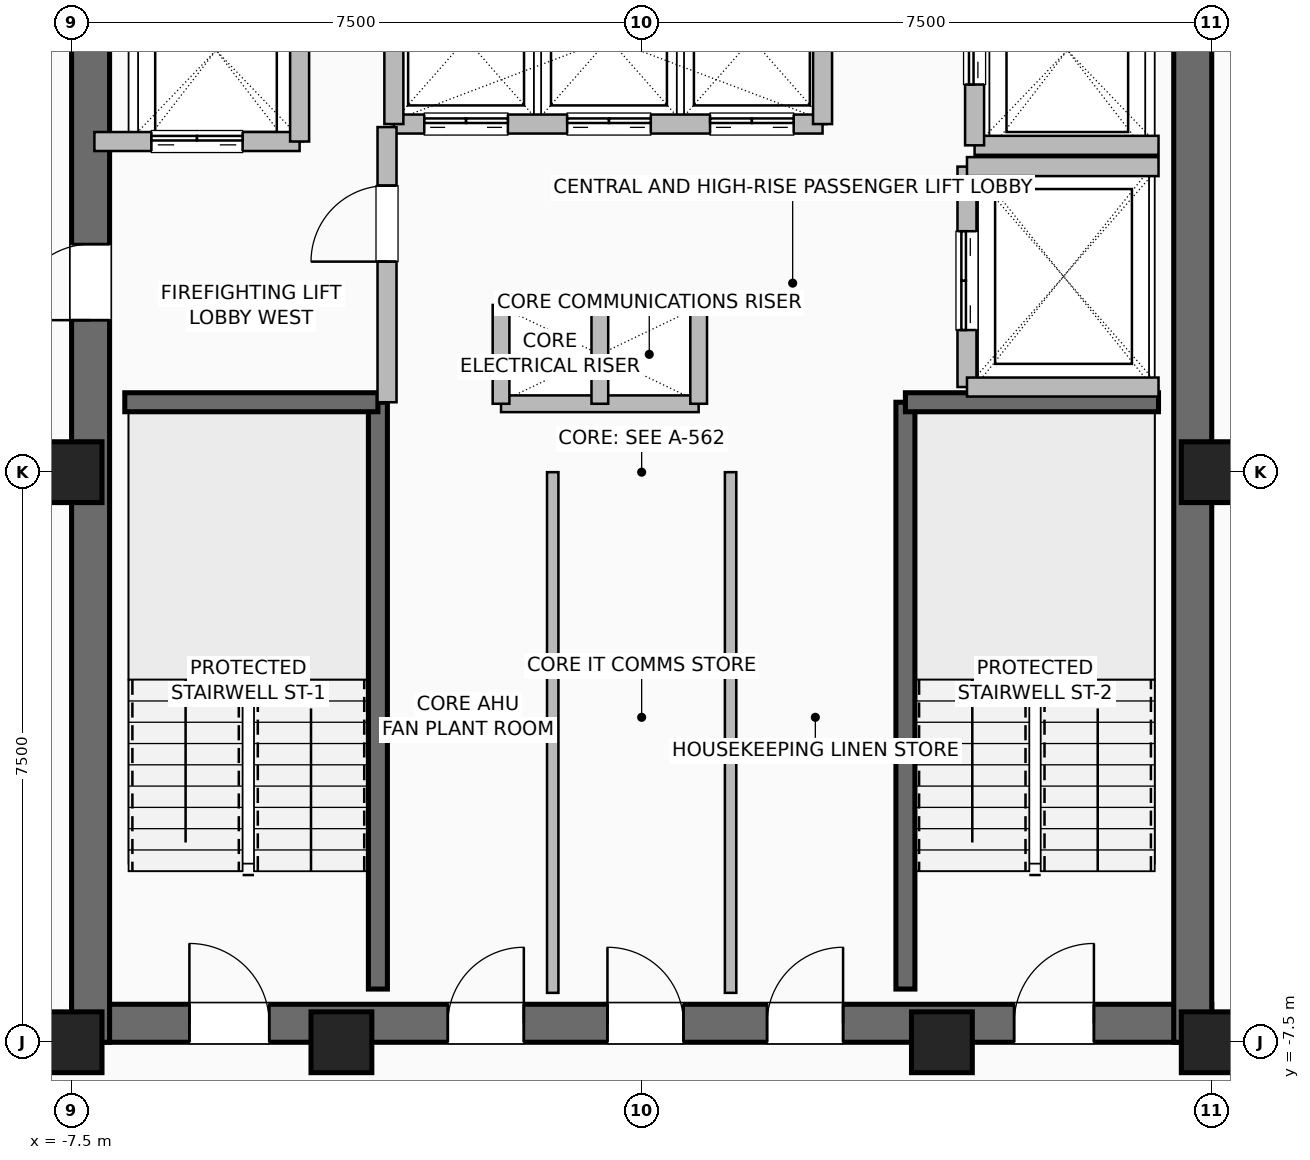
"""IFC4 building model, lengths in metres.
Left out: names, types, materials, properties, quantities, classifications, styles, units other than length and angle.
Written with IfcOpenShell. Run it as: python <this file> out.ifc"""

import sys

from ifc_helpers import new_model, si_unit, direction, frame, frame_2d, origin, origin_2d, place, context, subcontext, project, spatial, rectangle, hollow_rectangle, extrude, element, fill, save


model = new_model("IFC4")
c1 = context("Model", 3, precision=1e-05, world=origin(), true_north=direction((0.0, 1.0)))
c2 = subcontext(c1, "Body", "Model", "MODEL_VIEW")
j1 = project(units=[si_unit("LENGTHUNIT", "METRE"), si_unit("PLANEANGLEUNIT", "RADIAN")], contexts=[c1])
p1 = place(None, origin())
s1 = spatial("IfcSite", under=j1, at=p1, CompositionType="ELEMENT")
p2 = place(p1, origin())
s2 = spatial("IfcBuilding", under=s1, at=p2, CompositionType="ELEMENT")
p3 = place(p2, frame((0.0, 0.0, 250.4)))
s3 = spatial("IfcBuildingStorey", under=s2, at=p3, CompositionType="ELEMENT", Elevation=250.4)
for number, where, z_axis, x_axis in (
    (1, (-7.5, -7.5, 0.0), (0.0, 0.0, 1.0), (1.0, 0.0, 0.0)),
    (2, (-3.95, -7.5, 0.0), (0.0, 0.0, 1.0), (1.0, 0.0, 0.0)),
    (3, (3.95, -7.5, 0.0), (0.0, 0.0, 1.0), (1.0, 0.0, 0.0)),
    (4, (7.5, -7.5, 0.0), (0.0, 0.0, 1.0), (1.0, 0.0, 0.0)),
    (5, (7.5, 0.0, 0.0), (0.0, 0.0, 1.0), (1.0, 0.0, 0.0)),
    (6, (-7.5, 0.0, 0.0), (0.0, 0.0, 1.0), (1.0, 0.0, 0.0)),
):
    element("IfcColumn", number, at=place(p3, frame(where, z_axis=z_axis, x_axis=x_axis)), inside=s3, PredefinedType="COLUMN", context=c2, shape_type="SweptSolid", body=[
        extrude(hollow_rectangle(XDim=0.8, YDim=0.8, WallThickness=0.04, at=origin_2d()), origin(), (0.0, 0.0, 1.0), 3.6),
    ])
p4 = place(p3, frame((-7.5, -7.25, 0.0), z_axis=(0.0, 0.0, 1.0), x_axis=(1.0, 0.0, 0.0)))
e7 = element("IfcWall", 7, at=p4, inside=s3, PredefinedType="SHEAR", context=c2, shape_type="SweptSolid", body=[
    extrude(rectangle(XDim=15.0, YDim=0.5, at=frame_2d((7.5, 0.0))), origin(), (0.0, 0.0, 1.0), 3.36),
])
p5 = place(p4, frame((1.55, 0.0, 0.0)))
e8 = element("IfcOpeningElement", 8, at=p5, cuts=e7, PredefinedType="OPENING", context=c2, shape_type="SweptSolid", body=[
    extrude(rectangle(XDim=1.05, YDim=2.08, at=frame_2d((0.525, 1.04))), frame((0.0, 0.26, 0.0), z_axis=(0.0, -1.0, 0.0), x_axis=(1.0, 0.0, 0.0)), (0.0, 0.0, 1.0), 0.52),
])
p6 = place(p4, frame((12.4, 0.0, 0.0)))
e9 = element("IfcOpeningElement", 9, at=p6, cuts=e7, PredefinedType="OPENING", context=c2, shape_type="SweptSolid", body=[
    extrude(rectangle(XDim=1.05, YDim=2.08, at=frame_2d((0.525, 1.04))), frame((0.0, 0.26, 0.0), z_axis=(0.0, -1.0, 0.0), x_axis=(1.0, 0.0, 0.0)), (0.0, 0.0, 1.0), 0.52),
])
p7 = place(p4, frame((4.95, 0.0, 0.0)))
e10 = element("IfcOpeningElement", 10, at=p7, cuts=e7, PredefinedType="OPENING", context=c2, shape_type="SweptSolid", body=[
    extrude(rectangle(XDim=1.0, YDim=2.08, at=frame_2d((0.5, 1.04))), frame((0.0, 0.26, 0.0), z_axis=(0.0, -1.0, 0.0), x_axis=(1.0, 0.0, 0.0)), (0.0, 0.0, 1.0), 0.52),
])
p8 = place(p4, frame((7.05, 0.0, 0.0)))
e11 = element("IfcOpeningElement", 11, at=p8, cuts=e7, PredefinedType="OPENING", context=c2, shape_type="SweptSolid", body=[
    extrude(rectangle(XDim=1.0, YDim=2.08, at=frame_2d((0.5, 1.04))), frame((0.0, 0.26, 0.0), z_axis=(0.0, -1.0, 0.0), x_axis=(1.0, 0.0, 0.0)), (0.0, 0.0, 1.0), 0.52),
])
p9 = place(p4, frame((9.15, 0.0, 0.0)))
e12 = element("IfcOpeningElement", 12, at=p9, cuts=e7, PredefinedType="OPENING", context=c2, shape_type="SweptSolid", body=[
    extrude(rectangle(XDim=1.0, YDim=2.08, at=frame_2d((0.5, 1.04))), frame((0.0, 0.26, 0.0), z_axis=(0.0, -1.0, 0.0), x_axis=(1.0, 0.0, 0.0)), (0.0, 0.0, 1.0), 0.52),
])
p10 = place(p3, frame((-7.25, -7.5, 0.0), z_axis=(0.0, 0.0, 1.0), x_axis=(0.0, 1.0, 0.0)))
e13 = element("IfcWall", 13, at=p10, inside=s3, PredefinedType="SHEAR", context=c2, shape_type="SweptSolid", body=[
    extrude(rectangle(XDim=15.0, YDim=0.5, at=frame_2d((7.5, 0.0))), origin(), (0.0, 0.0, 1.0), 3.36),
])
p11 = place(p10, frame((9.5, 0.0, 0.0)))
e14 = element("IfcOpeningElement", 14, at=p11, cuts=e13, PredefinedType="OPENING", context=c2, shape_type="SweptSolid", body=[
    extrude(rectangle(XDim=1.0, YDim=2.08, at=frame_2d((0.5, 1.04))), frame((0.0, 0.26, 0.0), z_axis=(0.0, -1.0, 0.0), x_axis=(1.0, 0.0, 0.0)), (0.0, 0.0, 1.0), 0.52),
])
p12 = place(p3, frame((7.25, -7.5, 0.0), z_axis=(0.0, 0.0, 1.0), x_axis=(0.0, 1.0, 0.0)))
e15 = element("IfcWall", 15, at=p12, inside=s3, PredefinedType="SHEAR", context=c2, shape_type="SweptSolid", body=[
    extrude(rectangle(XDim=15.0, YDim=0.5, at=frame_2d((7.5, 0.0))), origin(), (0.0, 0.0, 1.0), 3.36),
])
p13 = place(p3, frame((-3.47, -6.8, 0.0), z_axis=(0.0, 0.0, 1.0), x_axis=(0.0, 1.0, 0.0)))
e16 = element("IfcWall", 16, at=p13, inside=s3, PredefinedType="SHEAR", context=c2, shape_type="SweptSolid", body=[
    extrude(rectangle(XDim=7.72, YDim=0.25, at=frame_2d((3.86, 0.0))), origin(), (0.0, 0.0, 1.0), 3.36),
])
p14 = place(p3, frame((-6.8, 0.92, 0.0), z_axis=(0.0, 0.0, 1.0), x_axis=(1.0, 0.0, 0.0)))
e17 = element("IfcWall", 17, at=p14, inside=s3, PredefinedType="SHEAR", context=c2, shape_type="SweptSolid", body=[
    extrude(rectangle(XDim=3.33, YDim=0.25, at=frame_2d((1.665, 0.0))), origin(), (0.0, 0.0, 1.0), 3.36),
])
p15 = place(p3, frame((3.47, -6.8, 0.0), z_axis=(0.0, 0.0, 1.0), x_axis=(0.0, 1.0, 0.0)))
e18 = element("IfcWall", 18, at=p15, inside=s3, PredefinedType="SHEAR", context=c2, shape_type="SweptSolid", body=[
    extrude(rectangle(XDim=7.72, YDim=0.25, at=frame_2d((3.86, 0.0))), origin(), (0.0, 0.0, 1.0), 3.36),
])
p16 = place(p3, frame((3.47, 0.92, 0.0), z_axis=(0.0, 0.0, 1.0), x_axis=(1.0, 0.0, 0.0)))
e19 = element("IfcWall", 19, at=p16, inside=s3, PredefinedType="SHEAR", context=c2, shape_type="SweptSolid", body=[
    extrude(rectangle(XDim=3.33, YDim=0.25, at=frame_2d((1.665, 0.0))), origin(), (0.0, 0.0, 1.0), 3.36),
])
for number, where, z_axis, x_axis in (
    (20, (-1.85, 2.2, 0.0), (0.0, 0.0, 1.0), (1.0, 0.0, 0.0)),
    (21, (-1.85, 0.9, 0.0), (0.0, 0.0, 1.0), (1.0, 0.0, 0.0)),
):
    element("IfcWall", number, at=place(p3, frame(where, z_axis=z_axis, x_axis=x_axis)), inside=s3, PredefinedType="PARTITIONING", context=c2, shape_type="SweptSolid", body=[
        extrude(rectangle(XDim=2.6, YDim=0.22, at=frame_2d((1.3, 0.0))), origin(), (0.0, 0.0, 1.0), 3.36),
    ])
for number, where, z_axis, x_axis in (
    (22, (-0.55, 0.9, 0.0), (0.0, 0.0, 1.0), (0.0, 1.0, 0.0)),
    (23, (0.75, 0.9, 0.0), (0.0, 0.0, 1.0), (0.0, 1.0, 0.0)),
    (24, (-1.85, 0.9, 0.0), (0.0, 0.0, 1.0), (0.0, 1.0, 0.0)),
):
    element("IfcWall", number, at=place(p3, frame(where, z_axis=z_axis, x_axis=x_axis)), inside=s3, PredefinedType="PARTITIONING", context=c2, shape_type="SweptSolid", body=[
        extrude(rectangle(XDim=1.3, YDim=0.22, at=frame_2d((0.65, 0.0))), origin(), (0.0, 0.0, 1.0), 3.36),
    ])
p17 = place(p3, frame((-3.26, 4.58, 0.0), z_axis=(0.0, 0.0, 1.0), x_axis=(1.0, 0.0, 0.0)))
e25 = element("IfcWall", 25, at=p17, inside=s3, PredefinedType="SHEAR", context=c2, shape_type="SweptSolid", body=[
    extrude(rectangle(XDim=5.64, YDim=0.25, at=frame_2d((2.82, 0.0))), origin(), (0.0, 0.0, 1.0), 3.36),
])
p18 = place(p17, frame((0.4, 0.0, 0.0)))
e26 = element("IfcOpeningElement", 26, at=p18, cuts=e25, PredefinedType="OPENING", context=c2, shape_type="SweptSolid", body=[
    extrude(rectangle(XDim=1.1, YDim=2.2, at=frame_2d((0.55, 1.1))), frame((0.0, 0.135, 0.0), z_axis=(0.0, -1.0, 0.0), x_axis=(1.0, 0.0, 0.0)), (0.0, 0.0, 1.0), 0.27),
])
p19 = place(p17, frame((2.28, 0.0, 0.0)))
e27 = element("IfcOpeningElement", 27, at=p19, cuts=e25, PredefinedType="OPENING", context=c2, shape_type="SweptSolid", body=[
    extrude(rectangle(XDim=1.1, YDim=2.2, at=frame_2d((0.55, 1.1))), frame((0.0, 0.135, 0.0), z_axis=(0.0, -1.0, 0.0), x_axis=(1.0, 0.0, 0.0)), (0.0, 0.0, 1.0), 0.27),
])
p20 = place(p17, frame((4.16, 0.0, 0.0)))
e28 = element("IfcOpeningElement", 28, at=p20, cuts=e25, PredefinedType="OPENING", context=c2, shape_type="SweptSolid", body=[
    extrude(rectangle(XDim=1.1, YDim=2.2, at=frame_2d((0.55, 1.1))), frame((0.0, 0.135, 0.0), z_axis=(0.0, -1.0, 0.0), x_axis=(1.0, 0.0, 0.0)), (0.0, 0.0, 1.0), 0.27),
])
for number, where, z_axis, x_axis in (
    (29, (-3.26, 4.58, 0.0), (0.0, 0.0, 1.0), (0.0, 1.0, 0.0)),
    (30, (2.38, 4.58, 0.0), (0.0, 0.0, 1.0), (0.0, 1.0, 0.0)),
):
    element("IfcWall", number, at=place(p3, frame(where, z_axis=z_axis, x_axis=x_axis)), inside=s3, PredefinedType="SHEAR", context=c2, shape_type="SweptSolid", body=[
        extrude(rectangle(XDim=2.22, YDim=0.25, at=frame_2d((1.11, 0.0))), origin(), (0.0, 0.0, 1.0), 3.36),
    ])
p21 = place(p3, frame((-7.2, 4.35, 0.0), z_axis=(0.0, 0.0, 1.0), x_axis=(1.0, 0.0, 0.0)))
e31 = element("IfcWall", 31, at=p21, inside=s3, PredefinedType="SHEAR", context=c2, shape_type="SweptSolid", body=[
    extrude(rectangle(XDim=2.7, YDim=0.25, at=frame_2d((1.35, 0.0))), origin(), (0.0, 0.0, 1.0), 3.36),
])
p22 = place(p21, frame((0.75, 0.0, 0.0)))
e32 = element("IfcOpeningElement", 32, at=p22, cuts=e31, PredefinedType="OPENING", context=c2, shape_type="SweptSolid", body=[
    extrude(rectangle(XDim=1.2, YDim=2.2, at=frame_2d((0.6, 1.1))), frame((0.0, 0.135, 0.0), z_axis=(0.0, -1.0, 0.0), x_axis=(1.0, 0.0, 0.0)), (0.0, 0.0, 1.0), 0.27),
])
p23 = place(p3, frame((-4.5, 4.35, 0.0), z_axis=(0.0, 0.0, 1.0), x_axis=(0.0, 1.0, 0.0)))
e33 = element("IfcWall", 33, at=p23, inside=s3, PredefinedType="SHEAR", context=c2, shape_type="SweptSolid", body=[
    extrude(rectangle(XDim=2.85, YDim=0.25, at=frame_2d((1.425, 0.0))), origin(), (0.0, 0.0, 1.0), 3.36),
])
p24 = place(p3, frame((4.38, 4.3, 0.0), z_axis=(0.0, 0.0, 1.0), x_axis=(1.0, 0.0, 0.0)))
e34 = element("IfcWall", 34, at=p24, inside=s3, PredefinedType="SHEAR", context=c2, shape_type="SweptSolid", body=[
    extrude(rectangle(XDim=2.42, YDim=0.25, at=frame_2d((1.21, 0.0))), origin(), (0.0, 0.0, 1.0), 3.36),
])
p25 = place(p3, frame((4.38, 4.3, 0.0), z_axis=(0.0, 0.0, 1.0), x_axis=(0.0, 1.0, 0.0)))
e35 = element("IfcWall", 35, at=p25, inside=s3, PredefinedType="SHEAR", context=c2, shape_type="SweptSolid", body=[
    extrude(rectangle(XDim=2.5, YDim=0.25, at=frame_2d((1.25, 0.0))), origin(), (0.0, 0.0, 1.0), 3.36),
])
p26 = place(p25, frame((0.8, 0.0, 0.0)))
e36 = element("IfcOpeningElement", 36, at=p26, cuts=e35, PredefinedType="OPENING", context=c2, shape_type="SweptSolid", body=[
    extrude(rectangle(XDim=1.2, YDim=2.2, at=frame_2d((0.6, 1.1))), frame((0.0, 0.135, 0.0), z_axis=(0.0, -1.0, 0.0), x_axis=(1.0, 0.0, 0.0)), (0.0, 0.0, 1.0), 0.27),
])
p27 = place(p3, frame((4.28, 1.12, 0.0), z_axis=(0.0, 0.0, 1.0), x_axis=(0.0, 1.0, 0.0)))
e37 = element("IfcWall", 37, at=p27, inside=s3, PredefinedType="SHEAR", context=c2, shape_type="SweptSolid", body=[
    extrude(rectangle(XDim=2.9, YDim=0.25, at=frame_2d((1.45, 0.0))), origin(), (0.0, 0.0, 1.0), 3.36),
])
p28 = place(p27, frame((0.75, 0.0, 0.0)))
e38 = element("IfcOpeningElement", 38, at=p28, cuts=e37, PredefinedType="OPENING", context=c2, shape_type="SweptSolid", body=[
    extrude(rectangle(XDim=1.3, YDim=2.3, at=frame_2d((0.65, 1.15))), frame((0.0, 0.135, 0.0), z_axis=(0.0, -1.0, 0.0), x_axis=(1.0, 0.0, 0.0)), (0.0, 0.0, 1.0), 0.27),
])
for number, where, z_axis, x_axis in (
    (39, (4.28, 1.12, 0.0), (0.0, 0.0, 1.0), (1.0, 0.0, 0.0)),
    (40, (4.28, 4.02, 0.0), (0.0, 0.0, 1.0), (1.0, 0.0, 0.0)),
):
    element("IfcWall", number, at=place(p3, frame(where, z_axis=z_axis, x_axis=x_axis)), inside=s3, PredefinedType="SHEAR", context=c2, shape_type="SweptSolid", body=[
        extrude(rectangle(XDim=2.52, YDim=0.25, at=frame_2d((1.26, 0.0))), origin(), (0.0, 0.0, 1.0), 3.36),
    ])
p29 = place(p3, frame((-3.35, 0.92, 0.0), z_axis=(0.0, 0.0, 1.0), x_axis=(0.0, 1.0, 0.0)))
e41 = element("IfcWall", 41, at=p29, inside=s3, PredefinedType="SHEAR", context=c2, shape_type="SweptSolid", body=[
    extrude(rectangle(XDim=3.62, YDim=0.25, at=frame_2d((1.81, 0.0))), origin(), (0.0, 0.0, 1.0), 3.36),
])
p30 = place(p29, frame((1.85, 0.0, 0.0)))
e42 = element("IfcOpeningElement", 42, at=p30, cuts=e41, PredefinedType="OPENING", context=c2, shape_type="SweptSolid", body=[
    extrude(rectangle(XDim=1.0, YDim=2.08, at=frame_2d((0.5, 1.04))), frame((0.0, 0.135, 0.0), z_axis=(0.0, -1.0, 0.0), x_axis=(1.0, 0.0, 0.0)), (0.0, 0.0, 1.0), 0.27),
])
for number, where, z_axis, x_axis in (
    (43, (-1.17, -6.85, 0.0), (0.0, 0.0, 1.0), (0.0, 1.0, 0.0)),
    (44, (1.17, -6.85, 0.0), (0.0, 0.0, 1.0), (0.0, 1.0, 0.0)),
):
    element("IfcWall", number, at=place(p3, frame(where, z_axis=z_axis, x_axis=x_axis)), inside=s3, PredefinedType="PARTITIONING", context=c2, shape_type="SweptSolid", body=[
        extrude(rectangle(XDim=6.85, YDim=0.15, at=frame_2d((3.425, 0.0))), origin(), (0.0, 0.0, 1.0), 3.36),
    ])
p31 = place(p3, frame((7.45, -7.48, 0.0), z_axis=(0.0, 0.0, 1.0), x_axis=(1.0, 0.0, 0.0)))
e45 = element("IfcWall", 45, at=p31, inside=s3, PredefinedType="PARTITIONING", context=c2, shape_type="SweptSolid", body=[
    extrude(rectangle(XDim=0.95, YDim=0.15, at=frame_2d((0.475, 0.0))), origin(), (0.0, 0.0, 1.0), 3.36),
])
p32 = place(p5, origin())
e46 = element("IfcDoor", 46, at=p32, inside=s3, OperationType="SINGLE_SWING_LEFT", PredefinedType="DOOR", context=c2, shape_type="SweptSolid", body=[
    extrude(rectangle(XDim=1.05, YDim=2.08, at=frame_2d((0.525, 1.04))), frame((0.0, 0.025, 0.0), z_axis=(0.0, -1.0, 0.0), x_axis=(1.0, 0.0, 0.0)), (0.0, 0.0, 1.0), 0.05),
])
fill(e8, e46)
p33 = place(p6, origin())
e47 = element("IfcDoor", 47, at=p33, inside=s3, OperationType="SINGLE_SWING_RIGHT", PredefinedType="DOOR", context=c2, shape_type="SweptSolid", body=[
    extrude(rectangle(XDim=1.05, YDim=2.08, at=frame_2d((0.525, 1.04))), frame((0.0, 0.025, 0.0), z_axis=(0.0, -1.0, 0.0), x_axis=(1.0, 0.0, 0.0)), (0.0, 0.0, 1.0), 0.05),
])
fill(e9, e47)
p34 = place(p11, origin())
e48 = element("IfcDoor", 48, at=p34, inside=s3, OperationType="SINGLE_SWING_LEFT", PredefinedType="DOOR", context=c2, shape_type="SweptSolid", body=[
    extrude(rectangle(XDim=1.0, YDim=2.08, at=frame_2d((0.5, 1.04))), frame((0.0, 0.025, 0.0), z_axis=(0.0, -1.0, 0.0), x_axis=(1.0, 0.0, 0.0)), (0.0, 0.0, 1.0), 0.05),
])
fill(e14, e48)
p35 = place(p7, origin())
e49 = element("IfcDoor", 49, at=p35, inside=s3, OperationType="SINGLE_SWING_RIGHT", PredefinedType="DOOR", context=c2, shape_type="SweptSolid", body=[
    extrude(rectangle(XDim=1.0, YDim=2.08, at=frame_2d((0.5, 1.04))), frame((0.0, 0.025, 0.0), z_axis=(0.0, -1.0, 0.0), x_axis=(1.0, 0.0, 0.0)), (0.0, 0.0, 1.0), 0.05),
])
fill(e10, e49)
p36 = place(p8, origin())
e50 = element("IfcDoor", 50, at=p36, inside=s3, OperationType="SINGLE_SWING_LEFT", PredefinedType="DOOR", context=c2, shape_type="SweptSolid", body=[
    extrude(rectangle(XDim=1.0, YDim=2.08, at=frame_2d((0.5, 1.04))), frame((0.0, 0.025, 0.0), z_axis=(0.0, -1.0, 0.0), x_axis=(1.0, 0.0, 0.0)), (0.0, 0.0, 1.0), 0.05),
])
fill(e11, e50)
p37 = place(p9, origin())
e51 = element("IfcDoor", 51, at=p37, inside=s3, OperationType="SINGLE_SWING_RIGHT", PredefinedType="DOOR", context=c2, shape_type="SweptSolid", body=[
    extrude(rectangle(XDim=1.0, YDim=2.08, at=frame_2d((0.5, 1.04))), frame((0.0, 0.025, 0.0), z_axis=(0.0, -1.0, 0.0), x_axis=(1.0, 0.0, 0.0)), (0.0, 0.0, 1.0), 0.05),
])
fill(e12, e51)
p38 = place(p18, origin())
e52 = element("IfcDoor", 52, at=p38, inside=s3, OperationType="DOUBLE_DOOR_SLIDING", PredefinedType="DOOR", context=c2, shape_type="SweptSolid", body=[
    extrude(rectangle(XDim=1.1, YDim=2.2, at=frame_2d((0.55, 1.1))), frame((0.0, 0.025, 0.0), z_axis=(0.0, -1.0, 0.0), x_axis=(1.0, 0.0, 0.0)), (0.0, 0.0, 1.0), 0.05),
])
fill(e26, e52)
p39 = place(p19, origin())
e53 = element("IfcDoor", 53, at=p39, inside=s3, OperationType="DOUBLE_DOOR_SLIDING", PredefinedType="DOOR", context=c2, shape_type="SweptSolid", body=[
    extrude(rectangle(XDim=1.1, YDim=2.2, at=frame_2d((0.55, 1.1))), frame((0.0, 0.025, 0.0), z_axis=(0.0, -1.0, 0.0), x_axis=(1.0, 0.0, 0.0)), (0.0, 0.0, 1.0), 0.05),
])
fill(e27, e53)
p40 = place(p20, origin())
e54 = element("IfcDoor", 54, at=p40, inside=s3, OperationType="DOUBLE_DOOR_SLIDING", PredefinedType="DOOR", context=c2, shape_type="SweptSolid", body=[
    extrude(rectangle(XDim=1.1, YDim=2.2, at=frame_2d((0.55, 1.1))), frame((0.0, 0.025, 0.0), z_axis=(0.0, -1.0, 0.0), x_axis=(1.0, 0.0, 0.0)), (0.0, 0.0, 1.0), 0.05),
])
fill(e28, e54)
p41 = place(p22, origin())
e55 = element("IfcDoor", 55, at=p41, inside=s3, OperationType="DOUBLE_DOOR_SLIDING", PredefinedType="DOOR", context=c2, shape_type="SweptSolid", body=[
    extrude(rectangle(XDim=1.2, YDim=2.2, at=frame_2d((0.6, 1.1))), frame((0.0, 0.025, 0.0), z_axis=(0.0, -1.0, 0.0), x_axis=(1.0, 0.0, 0.0)), (0.0, 0.0, 1.0), 0.05),
])
fill(e32, e55)
p42 = place(p26, origin())
e56 = element("IfcDoor", 56, at=p42, inside=s3, OperationType="DOUBLE_DOOR_SLIDING", PredefinedType="DOOR", context=c2, shape_type="SweptSolid", body=[
    extrude(rectangle(XDim=1.2, YDim=2.2, at=frame_2d((0.6, 1.1))), frame((0.0, 0.025, 0.0), z_axis=(0.0, -1.0, 0.0), x_axis=(1.0, 0.0, 0.0)), (0.0, 0.0, 1.0), 0.05),
])
fill(e36, e56)
p43 = place(p28, origin())
e57 = element("IfcDoor", 57, at=p43, inside=s3, OperationType="DOUBLE_DOOR_SLIDING", PredefinedType="DOOR", context=c2, shape_type="SweptSolid", body=[
    extrude(rectangle(XDim=1.3, YDim=2.3, at=frame_2d((0.65, 1.15))), frame((0.0, 0.025, 0.0), z_axis=(0.0, -1.0, 0.0), x_axis=(1.0, 0.0, 0.0)), (0.0, 0.0, 1.0), 0.05),
])
fill(e38, e57)
p44 = place(p30, origin())
e58 = element("IfcDoor", 58, at=p44, inside=s3, OperationType="SINGLE_SWING_LEFT", PredefinedType="DOOR", context=c2, shape_type="SweptSolid", body=[
    extrude(rectangle(XDim=1.0, YDim=2.08, at=frame_2d((0.5, 1.04))), frame((0.0, 0.025, 0.0), z_axis=(0.0, -1.0, 0.0), x_axis=(1.0, 0.0, 0.0)), (0.0, 0.0, 1.0), 0.05),
])
fill(e42, e58)
save(model, sys.argv[1])
